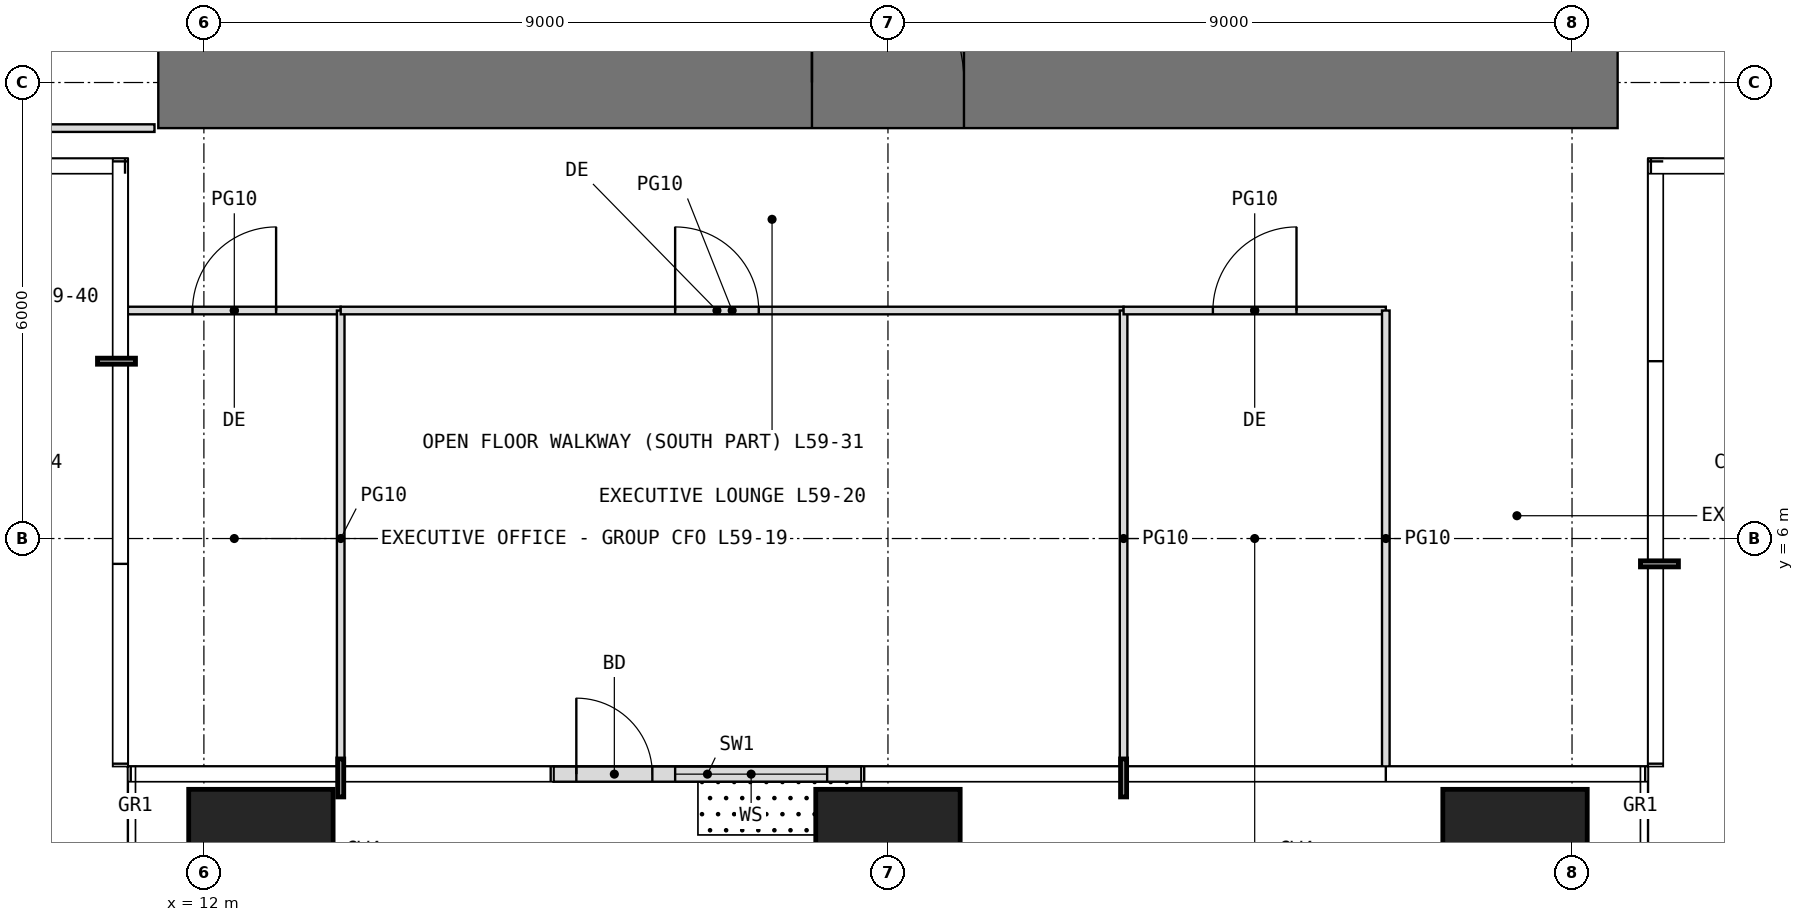
"""IFC4 building model, lengths in metres.
Left out: names, types, materials, properties, quantities, classifications, styles, units other than length and angle.
Written with IfcOpenShell. Run it as: python <this file> out.ifc"""

import sys

from ifc_helpers import new_model, si_unit, direction, frame, frame_2d, origin, origin_2d, place, context, subcontext, project, spatial, rectangle, extrude, element, fill, save


model = new_model("IFC4")
c1 = context("Model", 3, precision=1e-05, world=origin(), true_north=direction((0.0, 1.0)))
c2 = subcontext(c1, "Body", "Model", "MODEL_VIEW")
j1 = project(units=[si_unit("LENGTHUNIT", "METRE"), si_unit("PLANEANGLEUNIT", "RADIAN")], contexts=[c1])
p1 = place(None, origin())
s1 = spatial("IfcSite", under=j1, at=p1, CompositionType="ELEMENT")
p2 = place(p1, origin())
s2 = spatial("IfcBuilding", under=s1, at=p2, CompositionType="ELEMENT")
p3 = place(p2, frame((0.0, 0.0, 248.2)))
s3 = spatial("IfcBuildingStorey", under=s2, at=p3, CompositionType="ELEMENT", Elevation=248.2)
for number, where, z_axis, x_axis in (
    (1, (12.75, 1.75, 0.0), (0.0, 0.0, 1.0), (1.0, 0.0, 0.0)),
    (2, (21.0, 1.75, 0.0), (0.0, 0.0, 1.0), (1.0, 0.0, 0.0)),
    (3, (29.25, 1.75, 0.0), (0.0, 0.0, 1.0), (1.0, 0.0, 0.0)),
):
    element("IfcColumn", number, at=place(p3, frame(where, z_axis=z_axis, x_axis=x_axis)), inside=s3, PredefinedType="COLUMN", context=c2, shape_type="SweptSolid", body=[
        extrude(rectangle(XDim=1.9, YDim=1.9, at=origin_2d()), origin(), (0.0, 0.0, 1.0), 4.2),
    ])
p4 = place(p3, frame((16.6, 2.9, 0.0), z_axis=(0.0, 0.0, 1.0), x_axis=(1.0, 0.0, 0.0)))
e4 = element("IfcWall", 4, at=p4, inside=s3, PredefinedType="USERDEFINED", context=c2, shape_type="SweptSolid", body=[
    extrude(rectangle(XDim=4.05, YDim=0.2, at=frame_2d((2.025, 0.0))), origin(), (0.0, 0.0, 1.0), 3.95),
])
p5 = place(p4, frame((0.3, 0.0, 0.0)))
e5 = element("IfcOpeningElement", 5, at=p5, cuts=e4, PredefinedType="OPENING", context=c2, shape_type="SweptSolid", body=[
    extrude(rectangle(XDim=1.0, YDim=2.4, at=frame_2d((0.5, 1.2))), frame((0.0, 0.11, 0.0), z_axis=(0.0, -1.0, 0.0), x_axis=(1.0, 0.0, 0.0)), (0.0, 0.0, 1.0), 0.22),
])
p6 = place(p4, frame((1.6, 0.0, 0.3)))
e6 = element("IfcOpeningElement", 6, at=p6, cuts=e4, PredefinedType="OPENING", context=c2, shape_type="SweptSolid", body=[
    extrude(rectangle(XDim=2.0, YDim=2.7, at=frame_2d((1.0, 1.35))), frame((0.0, 0.11, 0.0), z_axis=(0.0, -1.0, 0.0), x_axis=(1.0, 0.0, 0.0)), (0.0, 0.0, 1.0), 0.22),
])
p7 = place(p3, frame((11.4, 12.0, -0.05), z_axis=(0.0, 0.0, 1.0), x_axis=(1.0, 0.0, 0.0)))
e7 = element("IfcWall", 7, at=p7, inside=s3, PredefinedType="SHEAR", context=c2, shape_type="SweptSolid", body=[
    extrude(rectangle(XDim=19.2, YDim=1.2, at=frame_2d((9.6, 0.0))), origin(), (0.0, 0.0, 1.0), 4.2),
])
p8 = place(p7, frame((8.6, 0.0, 0.05)))
e8 = element("IfcOpeningElement", 8, at=p8, cuts=e7, PredefinedType="OPENING", context=c2, shape_type="SweptSolid", body=[
    extrude(rectangle(XDim=2.0, YDim=2.2, at=frame_2d((1.0, 1.1))), frame((0.0, 0.61, 0.0), z_axis=(0.0, -1.0, 0.0), x_axis=(1.0, 0.0, 0.0)), (0.0, 0.0, 1.0), 1.22),
])
p9 = place(p3, frame((8.0, 11.4, 0.0), z_axis=(0.0, 0.0, 1.0), x_axis=(1.0, 0.0, 0.0)))
e9 = element("IfcWall", 9, at=p9, inside=s3, PredefinedType="PARTITIONING", context=c2, shape_type="SweptSolid", body=[
    extrude(rectangle(XDim=3.35, YDim=0.1, at=frame_2d((1.675, 0.0))), origin(), (0.0, 0.0, 1.0), 3.95),
])
p10 = place(p3, frame((11.0, 9.0, 0.0), z_axis=(0.0, 0.0, 1.0), x_axis=(1.0, 0.0, 0.0)))
e10 = element("IfcWall", 10, at=p10, inside=s3, PredefinedType="PARTITIONING", context=c2, shape_type="SweptSolid", body=[
    extrude(rectangle(XDim=2.8, YDim=0.1, at=frame_2d((1.4, 0.0))), origin(), (0.0, 0.0, 1.0), 3.95),
])
p11 = place(p10, frame((0.85, 0.0, 0.0)))
e11 = element("IfcOpeningElement", 11, at=p11, cuts=e10, PredefinedType="OPENING", context=c2, shape_type="SweptSolid", body=[
    extrude(rectangle(XDim=1.1, YDim=2.3, at=frame_2d((0.55, 1.15))), frame((0.0, 0.06, 0.0), z_axis=(0.0, -1.0, 0.0), x_axis=(1.0, 0.0, 0.0)), (0.0, 0.0, 1.0), 0.12),
])
p12 = place(p3, frame((13.8, 3.0, 0.0), z_axis=(0.0, 0.0, 1.0), x_axis=(0.0, 1.0, 0.0)))
e12 = element("IfcWall", 12, at=p12, inside=s3, PredefinedType="PARTITIONING", context=c2, shape_type="SweptSolid", body=[
    extrude(rectangle(XDim=6.0, YDim=0.1, at=frame_2d((3.0, 0.0))), origin(), (0.0, 0.0, 1.0), 3.95),
])
p13 = place(p3, frame((13.8, 9.0, 0.0), z_axis=(0.0, 0.0, 1.0), x_axis=(1.0, 0.0, 0.0)))
e13 = element("IfcWall", 13, at=p13, inside=s3, PredefinedType="PARTITIONING", context=c2, shape_type="SweptSolid", body=[
    extrude(rectangle(XDim=10.3, YDim=0.1, at=frame_2d((5.15, 0.0))), origin(), (0.0, 0.0, 1.0), 3.95),
])
p14 = place(p13, frame((4.4, 0.0, 0.0)))
e14 = element("IfcOpeningElement", 14, at=p14, cuts=e13, PredefinedType="OPENING", context=c2, shape_type="SweptSolid", body=[
    extrude(rectangle(XDim=1.1, YDim=2.3, at=frame_2d((0.55, 1.15))), frame((0.0, 0.06, 0.0), z_axis=(0.0, -1.0, 0.0), x_axis=(1.0, 0.0, 0.0)), (0.0, 0.0, 1.0), 0.12),
])
p15 = place(p3, frame((24.1, 3.0, 0.0), z_axis=(0.0, 0.0, 1.0), x_axis=(0.0, 1.0, 0.0)))
e15 = element("IfcWall", 15, at=p15, inside=s3, PredefinedType="PARTITIONING", context=c2, shape_type="SweptSolid", body=[
    extrude(rectangle(XDim=6.0, YDim=0.1, at=frame_2d((3.0, 0.0))), origin(), (0.0, 0.0, 1.0), 3.95),
])
p16 = place(p3, frame((24.1, 9.0, 0.0), z_axis=(0.0, 0.0, 1.0), x_axis=(1.0, 0.0, 0.0)))
e16 = element("IfcWall", 16, at=p16, inside=s3, PredefinedType="PARTITIONING", context=c2, shape_type="SweptSolid", body=[
    extrude(rectangle(XDim=3.45, YDim=0.1, at=frame_2d((1.725, 0.0))), origin(), (0.0, 0.0, 1.0), 3.95),
])
p17 = place(p16, frame((1.175, 0.0, 0.0)))
e17 = element("IfcOpeningElement", 17, at=p17, cuts=e16, PredefinedType="OPENING", context=c2, shape_type="SweptSolid", body=[
    extrude(rectangle(XDim=1.1, YDim=2.3, at=frame_2d((0.55, 1.15))), frame((0.0, 0.06, 0.0), z_axis=(0.0, -1.0, 0.0), x_axis=(1.0, 0.0, 0.0)), (0.0, 0.0, 1.0), 0.12),
])
p18 = place(p3, frame((27.55, 3.0, 0.0), z_axis=(0.0, 0.0, 1.0), x_axis=(0.0, 1.0, 0.0)))
e18 = element("IfcWall", 18, at=p18, inside=s3, PredefinedType="PARTITIONING", context=c2, shape_type="SweptSolid", body=[
    extrude(rectangle(XDim=6.0, YDim=0.1, at=frame_2d((3.0, 0.0))), origin(), (0.0, 0.0, 1.0), 3.95),
])
p19 = place(p5, origin())
e19 = element("IfcDoor", 19, at=p19, inside=s3, OperationType="SINGLE_SWING_LEFT", PredefinedType="DOOR", context=c2, shape_type="SweptSolid", body=[
    extrude(rectangle(XDim=1.0, YDim=2.4, at=frame_2d((0.5, 1.2))), frame((0.0, 0.025, 0.0), z_axis=(0.0, -1.0, 0.0), x_axis=(1.0, 0.0, 0.0)), (0.0, 0.0, 1.0), 0.05),
])
fill(e5, e19)
p20 = place(p6, origin())
e20 = element("IfcWindow", 20, at=p20, inside=s3, PartitioningType="SINGLE_PANEL", PredefinedType="WINDOW", context=c2, shape_type="SweptSolid", body=[
    extrude(rectangle(XDim=2.0, YDim=2.7, at=frame_2d((1.0, 1.35))), frame((0.0, 0.03, 0.0), z_axis=(0.0, -1.0, 0.0), x_axis=(1.0, 0.0, 0.0)), (0.0, 0.0, 1.0), 0.06),
])
fill(e6, e20)
p21 = place(p8, origin())
e21 = element("IfcDoor", 21, at=p21, inside=s3, OperationType="DOUBLE_DOOR_SINGLE_SWING", PredefinedType="DOOR", context=c2, shape_type="SweptSolid", body=[
    extrude(rectangle(XDim=2.0, YDim=2.2, at=frame_2d((1.0, 1.1))), frame((0.0, 0.025, 0.0), z_axis=(0.0, -1.0, 0.0), x_axis=(1.0, 0.0, 0.0)), (0.0, 0.0, 1.0), 0.05),
])
fill(e8, e21)
p22 = place(p11, origin())
e22 = element("IfcDoor", 22, at=p22, inside=s3, OperationType="SINGLE_SWING_RIGHT", PredefinedType="DOOR", context=c2, shape_type="SweptSolid", body=[
    extrude(rectangle(XDim=1.1, YDim=2.3, at=frame_2d((0.55, 1.15))), frame((0.0, 0.025, 0.0), z_axis=(0.0, -1.0, 0.0), x_axis=(1.0, 0.0, 0.0)), (0.0, 0.0, 1.0), 0.05),
])
fill(e11, e22)
p23 = place(p14, origin())
e23 = element("IfcDoor", 23, at=p23, inside=s3, OperationType="SINGLE_SWING_LEFT", PredefinedType="DOOR", context=c2, shape_type="SweptSolid", body=[
    extrude(rectangle(XDim=1.1, YDim=2.3, at=frame_2d((0.55, 1.15))), frame((0.0, 0.025, 0.0), z_axis=(0.0, -1.0, 0.0), x_axis=(1.0, 0.0, 0.0)), (0.0, 0.0, 1.0), 0.05),
])
fill(e14, e23)
p24 = place(p17, origin())
e24 = element("IfcDoor", 24, at=p24, inside=s3, OperationType="SINGLE_SWING_RIGHT", PredefinedType="DOOR", context=c2, shape_type="SweptSolid", body=[
    extrude(rectangle(XDim=1.1, YDim=2.3, at=frame_2d((0.55, 1.15))), frame((0.0, 0.025, 0.0), z_axis=(0.0, -1.0, 0.0), x_axis=(1.0, 0.0, 0.0)), (0.0, 0.0, 1.0), 0.05),
])
fill(e17, e24)
save(model, sys.argv[1])
